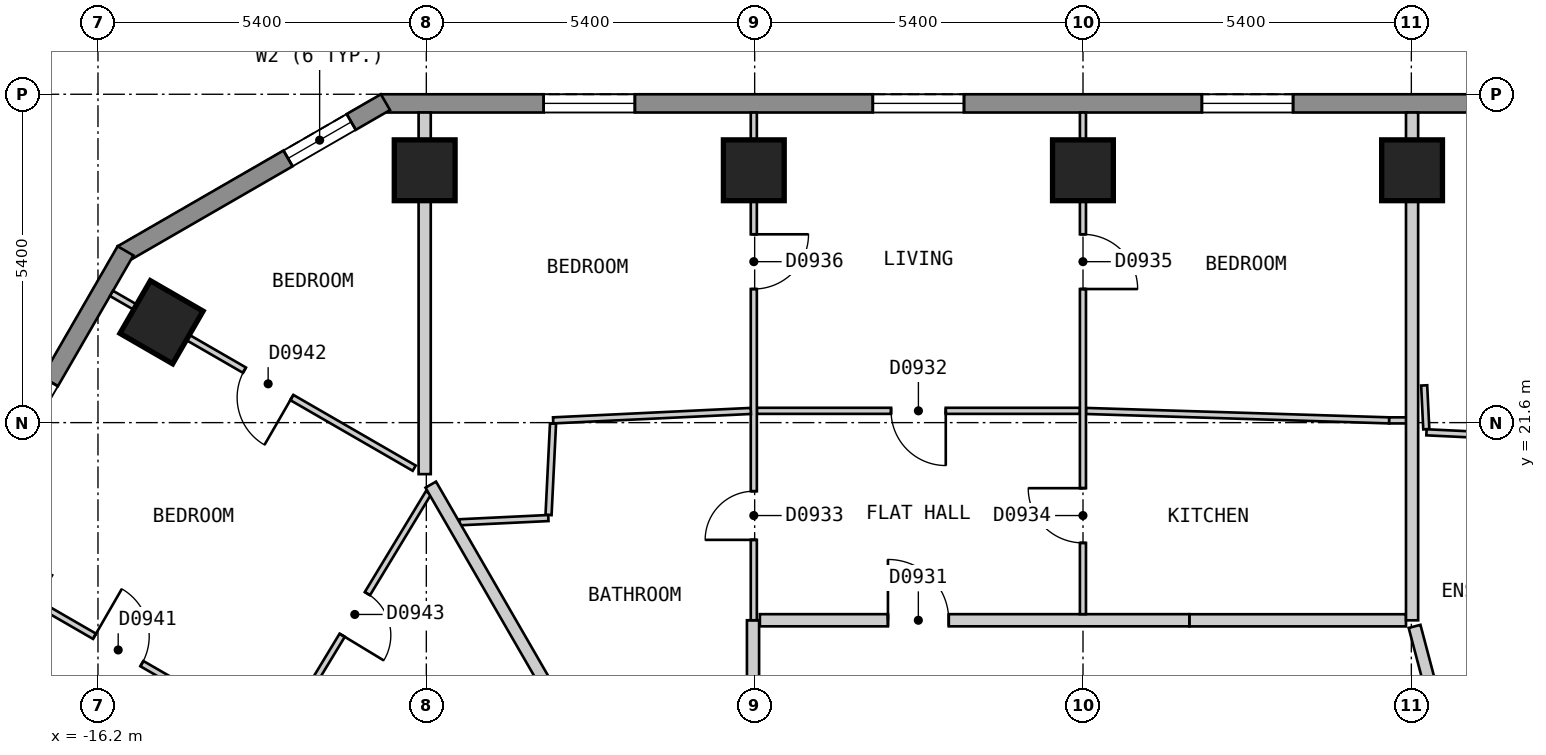
"""IFC4 building model, lengths in metres.
Left out: names, types, materials, properties, quantities, classifications, styles, units other than length and angle.
Written with IfcOpenShell. Run it as: python <this file> out.ifc"""

import sys

from ifc_helpers import new_model, si_unit, direction, frame, frame_2d, origin, origin_2d, place, context, subcontext, project, spatial, polyline, rectangle, outline, extrude, element, fill, save


model = new_model("IFC4")
c1 = context("Model", 3, precision=1e-05, world=origin(), true_north=direction((0.0, 1.0)))
c2 = subcontext(c1, "Body", "Model", "MODEL_VIEW")
j1 = project(units=[si_unit("LENGTHUNIT", "METRE"), si_unit("PLANEANGLEUNIT", "RADIAN")], contexts=[c1])
p1 = place(None, origin())
s1 = spatial("IfcSite", under=j1, at=p1, CompositionType="ELEMENT")
p2 = place(p1, origin())
s2 = spatial("IfcBuilding", under=s1, at=p2, CompositionType="ELEMENT")
p3 = place(p2, frame((0.0, 0.0, 90.0)))
s3 = spatial("IfcBuildingStorey", under=s2, at=p3, CompositionType="ELEMENT", Elevation=90.0)
for number, where, z_axis, x_axis in (
    (1, (5.412, 25.75, 0.0), (0.0, 0.0, 1.0), (-1.0, 0.0, 0.0)),
    (2, (-0.001, 25.75, 0.0), (0.0, 0.0, 1.0), (-1.0, 0.0, 0.0)),
    (3, (-5.414, 25.75, 0.0), (0.0, 0.0, 1.0), (-1.0, 0.0, 0.0)),
    (4, (-10.827, 25.75, 0.0), (0.0, 0.0, 1.0), (-1.0, 0.0, 0.0)),
    (5, (-15.155, 23.251, 0.0), (0.0, 0.0, 1.0), (-0.5, -0.866, 0.0)),
):
    element("IfcColumn", number, at=place(p3, frame(where, z_axis=z_axis, x_axis=x_axis)), inside=s3, PredefinedType="COLUMN", context=c2, shape_type="SweptSolid", body=[
        extrude(rectangle(XDim=1.0, YDim=1.0, at=origin_2d()), origin(), (0.0, 0.0, 1.0), 3.0),
    ])
p4 = place(p3, frame((11.547, 26.85, 0.0), z_axis=(0.0, 0.0, 1.0), x_axis=(-1.0, 0.0, 0.0)))
e6 = element("IfcWall", 6, at=p4, inside=s3, PredefinedType="SOLIDWALL", context=c2, shape_type="SweptSolid", body=[
    extrude(outline(polyline([(0.0, -0.15), (23.094, -0.15), (23.014, 0.15), (0.08, 0.15), (0.0, -0.15)])), origin(), (0.0, 0.0, 1.0), 2.7),
])
p5 = place(p4, frame((2.678, 0.0, 0.15)))
e7 = element("IfcOpeningElement", 7, at=p5, cuts=e6, PredefinedType="OPENING", context=c2, shape_type="SweptSolid", body=[
    extrude(rectangle(XDim=1.5, YDim=2.1, at=frame_2d((0.75, 1.05))), frame((0.0, 0.16, 0.0), z_axis=(0.0, -1.0, 0.0), x_axis=(1.0, 0.0, 0.0)), (0.0, 0.0, 1.0), 0.32),
])
p6 = place(p4, frame((8.092, 0.0, 0.15)))
e8 = element("IfcOpeningElement", 8, at=p6, cuts=e6, PredefinedType="OPENING", context=c2, shape_type="SweptSolid", body=[
    extrude(rectangle(XDim=1.5, YDim=2.1, at=frame_2d((0.75, 1.05))), frame((0.0, 0.16, 0.0), z_axis=(0.0, -1.0, 0.0), x_axis=(1.0, 0.0, 0.0)), (0.0, 0.0, 1.0), 0.32),
])
p7 = place(p4, frame((13.504, 0.0, 0.15)))
e9 = element("IfcOpeningElement", 9, at=p7, cuts=e6, PredefinedType="OPENING", context=c2, shape_type="SweptSolid", body=[
    extrude(rectangle(XDim=1.5, YDim=2.1, at=frame_2d((0.75, 1.05))), frame((0.0, 0.16, 0.0), z_axis=(0.0, -1.0, 0.0), x_axis=(1.0, 0.0, 0.0)), (0.0, 0.0, 1.0), 0.32),
])
p8 = place(p4, frame((18.917, 0.0, 0.15)))
e10 = element("IfcOpeningElement", 10, at=p8, cuts=e6, PredefinedType="OPENING", context=c2, shape_type="SweptSolid", body=[
    extrude(rectangle(XDim=1.5, YDim=2.1, at=frame_2d((0.75, 1.05))), frame((0.0, 0.16, 0.0), z_axis=(0.0, -1.0, 0.0), x_axis=(1.0, 0.0, 0.0)), (0.0, 0.0, 1.0), 0.32),
])
p9 = place(p3, frame((-11.472, 26.87, 0.0), z_axis=(0.0, 0.0, 1.0), x_axis=(-0.866022959057, -0.500004234368, 0.0)))
e11 = element("IfcWall", 11, at=p9, inside=s3, PredefinedType="SOLIDWALL", context=c2, shape_type="SweptSolid", body=[
    extrude(outline(polyline([(0.0, -0.15), (5.0, -0.15), (4.92, 0.15), (0.08, 0.15), (0.0, -0.15)])), origin(), (0.0, 0.0, 1.0), 2.7),
])
p10 = place(p9, frame((0.65, 0.0, 0.15)))
e12 = element("IfcOpeningElement", 12, at=p10, cuts=e11, PredefinedType="OPENING", context=c2, shape_type="SweptSolid", body=[
    extrude(rectangle(XDim=1.2, YDim=2.1, at=frame_2d((0.6, 1.05))), frame((0.0, 0.16, 0.0), z_axis=(0.0, -1.0, 0.0), x_axis=(1.0, 0.0, 0.0)), (0.0, 0.0, 1.0), 0.32),
])
p11 = place(p3, frame((-15.747, 24.425, 0.0), z_axis=(0.0, 0.0, 1.0), x_axis=(-0.500027479704, -0.866009537788, 0.0)))
e13 = element("IfcWall", 13, at=p11, inside=s3, PredefinedType="SOLIDWALL", context=c2, shape_type="SweptSolid", body=[
    extrude(outline(polyline([(0.0, -0.15), (26.559, -0.15), (26.478, 0.15), (0.08, 0.15), (0.0, -0.15)])), origin(), (0.0, 0.0, 1.0), 2.7),
])
p12 = place(p11, frame((2.483, 0.0, 0.15)))
e14 = element("IfcOpeningElement", 14, at=p12, cuts=e13, PredefinedType="OPENING", context=c2, shape_type="SweptSolid", body=[
    extrude(rectangle(XDim=1.5, YDim=2.1, at=frame_2d((0.75, 1.05))), frame((0.0, 0.16, 0.0), z_axis=(0.0, -1.0, 0.0), x_axis=(1.0, 0.0, 0.0)), (0.0, 0.0, 1.0), 0.32),
])
p13 = place(p11, frame((7.506, 0.0, 0.15)))
e15 = element("IfcOpeningElement", 15, at=p13, cuts=e13, PredefinedType="OPENING", context=c2, shape_type="SweptSolid", body=[
    extrude(rectangle(XDim=1.5, YDim=2.1, at=frame_2d((0.75, 1.05))), frame((0.0, 0.16, 0.0), z_axis=(0.0, -1.0, 0.0), x_axis=(1.0, 0.0, 0.0)), (0.0, 0.0, 1.0), 0.32),
])
p14 = place(p11, frame((12.529, 0.0, 0.15)))
e16 = element("IfcOpeningElement", 16, at=p14, cuts=e13, PredefinedType="OPENING", context=c2, shape_type="SweptSolid", body=[
    extrude(rectangle(XDim=1.5, YDim=2.1, at=frame_2d((0.75, 1.05))), frame((0.0, 0.16, 0.0), z_axis=(0.0, -1.0, 0.0), x_axis=(1.0, 0.0, 0.0)), (0.0, 0.0, 1.0), 0.32),
])
p15 = place(p11, frame((17.552, 0.0, 0.15)))
e17 = element("IfcOpeningElement", 17, at=p15, cuts=e13, PredefinedType="OPENING", context=c2, shape_type="SweptSolid", body=[
    extrude(rectangle(XDim=1.5, YDim=2.1, at=frame_2d((0.75, 1.05))), frame((0.0, 0.16, 0.0), z_axis=(0.0, -1.0, 0.0), x_axis=(1.0, 0.0, 0.0)), (0.0, 0.0, 1.0), 0.32),
])
p16 = place(p11, frame((22.575, 0.0, 0.15)))
e18 = element("IfcOpeningElement", 18, at=p16, cuts=e13, PredefinedType="OPENING", context=c2, shape_type="SweptSolid", body=[
    extrude(rectangle(XDim=1.5, YDim=2.1, at=frame_2d((0.75, 1.05))), frame((0.0, 0.16, 0.0), z_axis=(0.0, -1.0, 0.0), x_axis=(1.0, 0.0, 0.0)), (0.0, 0.0, 1.0), 0.32),
])
p17 = place(p3, frame((5.453, 18.249, 0.0), z_axis=(0.0, 0.0, 1.0), x_axis=(0.255385747764, -0.966839241983, 0.0)))
e19 = element("IfcWall", 19, at=p17, inside=s3, PredefinedType="PARTITIONING", context=c2, shape_type="SweptSolid", body=[
    extrude(rectangle(XDim=1.602, YDim=0.2, at=frame_2d((0.801, 0.0))), origin(), (0.0, 0.0, 1.0), 2.7),
])
p18 = place(p3, frame((1.75, 18.349, 0.0), z_axis=(0.0, 0.0, 1.0), x_axis=(1.0, 0.0, 0.0)))
e20 = element("IfcWall", 20, at=p18, inside=s3, PredefinedType="PARTITIONING", context=c2, shape_type="SweptSolid", body=[
    extrude(rectangle(XDim=3.562, YDim=0.2, at=frame_2d((1.781, 0.0))), origin(), (0.0, 0.0, 1.0), 2.7),
])
p19 = place(p3, frame((-5.314, 18.35, 0.0), z_axis=(0.0, 0.0, 1.0), x_axis=(1.0, 0.0, 0.0)))
e21 = element("IfcWall", 21, at=p19, inside=s3, PredefinedType="PARTITIONING", context=c2, shape_type="SweptSolid", body=[
    extrude(rectangle(XDim=7.063, YDim=0.2, at=frame_2d((3.531, 0.0))), origin(), (0.0, 0.0, 1.0), 2.7),
])
p20 = place(p19, frame((2.106, 0.0, 0.0)))
e22 = element("IfcOpeningElement", 22, at=p20, cuts=e21, PredefinedType="OPENING", context=c2, shape_type="SweptSolid", body=[
    extrude(rectangle(XDim=1.0, YDim=2.1, at=frame_2d((0.5, 1.05))), frame((0.0, 0.11, 0.0), z_axis=(0.0, -1.0, 0.0), x_axis=(1.0, 0.0, 0.0)), (0.0, 0.0, 1.0), 0.22),
])
p21 = place(p3, frame((-5.427, 17.4, 0.0), z_axis=(0.0, 0.0, 1.0), x_axis=(0.0, 1.0, 0.0)))
e23 = element("IfcWall", 23, at=p21, inside=s3, PredefinedType="PARTITIONING", context=c2, shape_type="SweptSolid", body=[
    extrude(rectangle(XDim=0.95, YDim=0.2, at=frame_2d((0.475, 0.0))), origin(), (0.0, 0.0, 1.0), 2.7),
])
p22 = place(p3, frame((5.611, 22.212, 0.0), z_axis=(0.0, 0.0, 1.0), x_axis=(0.048368650834, -0.998829551834, 0.0)))
e24 = element("IfcWall", 24, at=p22, inside=s3, PredefinedType="PARTITIONING", context=c2, shape_type="SweptSolid", body=[
    extrude(rectangle(XDim=0.722, YDim=0.1, at=frame_2d((0.361, 0.0))), origin(), (0.0, 0.0, 1.0), 2.7),
])
p23 = place(p3, frame((0.049, 21.792, 0.0), z_axis=(0.0, 0.0, 1.0), x_axis=(0.999517123417, -0.031072817652, 0.0)))
e25 = element("IfcWall", 25, at=p23, inside=s3, PredefinedType="PARTITIONING", context=c2, shape_type="SweptSolid", body=[
    extrude(rectangle(XDim=4.989, YDim=0.1, at=frame_2d((2.495, 0.0))), origin(), (0.0, 0.0, 1.0), 2.7),
])
p24 = place(p3, frame((5.649, 21.441, 0.0), z_axis=(0.0, 0.0, 1.0), x_axis=(0.998867332207, -0.047582062273, 0.0)))
e26 = element("IfcWall", 26, at=p24, inside=s3, PredefinedType="PARTITIONING", context=c2, shape_type="SweptSolid", body=[
    extrude(rectangle(XDim=2.058, YDim=0.1, at=frame_2d((1.029, 0.0))), origin(), (0.0, 0.0, 1.0), 2.7),
])
p25 = place(p3, frame((-18.489, 19.375, 0.0), z_axis=(0.0, 0.0, 1.0), x_axis=(0.866016855193, -0.500014806302, 0.0)))
e27 = element("IfcWall", 27, at=p25, inside=s3, PredefinedType="PARTITIONING", context=c2, shape_type="SweptSolid", body=[
    extrude(rectangle(XDim=10.0, YDim=0.1, at=frame_2d((5.0, 0.0))), origin(), (0.0, 0.0, 1.0), 2.7),
])
p26 = place(p25, frame((2.577, 0.0, 0.0)))
e28 = element("IfcOpeningElement", 28, at=p26, cuts=e27, PredefinedType="OPENING", context=c2, shape_type="SweptSolid", body=[
    extrude(rectangle(XDim=0.9, YDim=2.1, at=frame_2d((0.45, 1.05))), frame((0.0, 0.06, 0.0), z_axis=(0.0, -1.0, 0.0), x_axis=(1.0, 0.0, 0.0)), (0.0, 0.0, 1.0), 0.12),
])
p27 = place(p3, frame((-15.977, 23.725, 0.0), z_axis=(0.0, 0.0, 1.0), x_axis=(0.866028566888, -0.499994521305, 0.0)))
e29 = element("IfcWall", 29, at=p27, inside=s3, PredefinedType="PARTITIONING", context=c2, shape_type="SweptSolid", body=[
    extrude(rectangle(XDim=5.748, YDim=0.1, at=frame_2d((2.874, 0.0))), origin(), (0.0, 0.0, 1.0), 2.7),
])
p28 = place(p27, frame((2.524, 0.0, 0.0)))
e30 = element("IfcOpeningElement", 30, at=p28, cuts=e29, PredefinedType="OPENING", context=c2, shape_type="SweptSolid", body=[
    extrude(rectangle(XDim=0.9, YDim=2.1, at=frame_2d((0.45, 1.05))), frame((0.0, 0.06, 0.0), z_axis=(0.0, -1.0, 0.0), x_axis=(1.0, 0.0, 0.0)), (0.0, 0.0, 1.0), 0.12),
])
p29 = place(p3, frame((5.036, 21.637, 0.0), z_axis=(0.0, 0.0, 1.0), x_axis=(1.0, 0.0, 0.0)))
e31 = element("IfcWall", 31, at=p29, inside=s3, PredefinedType="PARTITIONING", context=c2, shape_type="SweptSolid", body=[
    extrude(rectangle(XDim=0.337, YDim=0.1, at=frame_2d((0.168, 0.0))), origin(), (0.0, 0.0, 1.0), 2.7),
])
p30 = place(p3, frame((-5.364, 21.794, 0.0), z_axis=(0.0, 0.0, 1.0), x_axis=(1.0, 0.0, 0.0)))
e32 = element("IfcWall", 32, at=p30, inside=s3, PredefinedType="PARTITIONING", context=c2, shape_type="SweptSolid", body=[
    extrude(rectangle(XDim=5.313, YDim=0.1, at=frame_2d((2.656, 0.0))), origin(), (0.0, 0.0, 1.0), 2.7),
])
p31 = place(p30, frame((2.207, 0.0, 0.0)))
e33 = element("IfcOpeningElement", 33, at=p31, cuts=e32, PredefinedType="OPENING", context=c2, shape_type="SweptSolid", body=[
    extrude(rectangle(XDim=0.9, YDim=2.1, at=frame_2d((0.45, 1.05))), frame((0.0, 0.06, 0.0), z_axis=(0.0, -1.0, 0.0), x_axis=(1.0, 0.0, 0.0)), (0.0, 0.0, 1.0), 0.12),
])
p32 = place(p3, frame((-13.221, 16.391, 0.0), z_axis=(0.0, 0.0, 1.0), x_axis=(0.518164725284, 0.855280841286, 0.0)))
e34 = element("IfcWall", 34, at=p32, inside=s3, PredefinedType="PARTITIONING", context=c2, shape_type="SweptSolid", body=[
    extrude(rectangle(XDim=4.74, YDim=0.1, at=frame_2d((2.37, 0.0))), origin(), (0.0, 0.0, 1.0), 2.7),
])
p33 = place(p32, frame((2.002, 0.0, 0.0)))
e35 = element("IfcOpeningElement", 35, at=p33, cuts=e34, PredefinedType="OPENING", context=c2, shape_type="SweptSolid", body=[
    extrude(rectangle(XDim=0.8, YDim=2.1, at=frame_2d((0.4, 1.05))), frame((0.0, 0.06, 0.0), z_axis=(0.0, -1.0, 0.0), x_axis=(1.0, 0.0, 0.0)), (0.0, 0.0, 1.0), 0.12),
])
p34 = place(p3, frame((-8.79, 20.081, 0.0), z_axis=(0.0, 0.0, 1.0), x_axis=(0.049097109821, 0.998794009697, 0.0)))
e36 = element("IfcWall", 36, at=p34, inside=s3, PredefinedType="PARTITIONING", context=c2, shape_type="SweptSolid", body=[
    extrude(rectangle(XDim=1.507, YDim=0.1, at=frame_2d((0.753, 0.0))), origin(), (0.0, 0.0, 1.0), 2.7),
])
p35 = place(p3, frame((-0.001, 18.45, 0.0), z_axis=(0.0, 0.0, 1.0), x_axis=(0.0, 1.0, 0.0)))
e37 = element("IfcWall", 37, at=p35, inside=s3, PredefinedType="PARTITIONING", context=c2, shape_type="SweptSolid", body=[
    extrude(rectangle(XDim=8.25, YDim=0.1, at=frame_2d((4.125, 0.0))), origin(), (0.0, 0.0, 1.0), 2.7),
])
p36 = place(p35, frame((1.172, 0.0, 0.0)))
e38 = element("IfcOpeningElement", 38, at=p36, cuts=e37, PredefinedType="OPENING", context=c2, shape_type="SweptSolid", body=[
    extrude(rectangle(XDim=0.9, YDim=2.1, at=frame_2d((0.45, 1.05))), frame((0.0, 0.06, 0.0), z_axis=(0.0, -1.0, 0.0), x_axis=(1.0, 0.0, 0.0)), (0.0, 0.0, 1.0), 0.12),
])
p37 = place(p35, frame((5.347, 0.0, 0.0)))
e39 = element("IfcOpeningElement", 39, at=p37, cuts=e37, PredefinedType="OPENING", context=c2, shape_type="SweptSolid", body=[
    extrude(rectangle(XDim=0.9, YDim=2.1, at=frame_2d((0.45, 1.05))), frame((0.0, 0.06, 0.0), z_axis=(0.0, -1.0, 0.0), x_axis=(1.0, 0.0, 0.0)), (0.0, 0.0, 1.0), 0.12),
])
p38 = place(p3, frame((-5.414, 18.35, 0.0), z_axis=(0.0, 0.0, 1.0), x_axis=(0.0, 1.0, 0.0)))
e40 = element("IfcWall", 40, at=p38, inside=s3, PredefinedType="PARTITIONING", context=c2, shape_type="SweptSolid", body=[
    extrude(rectangle(XDim=8.35, YDim=0.1, at=frame_2d((4.175, 0.0))), origin(), (0.0, 0.0, 1.0), 2.7),
])
p39 = place(p38, frame((1.322, 0.0, 0.0)))
e41 = element("IfcOpeningElement", 41, at=p39, cuts=e40, PredefinedType="OPENING", context=c2, shape_type="SweptSolid", body=[
    extrude(rectangle(XDim=0.8, YDim=2.1, at=frame_2d((0.4, 1.05))), frame((0.0, 0.06, 0.0), z_axis=(0.0, -1.0, 0.0), x_axis=(1.0, 0.0, 0.0)), (0.0, 0.0, 1.0), 0.12),
])
p40 = place(p38, frame((5.447, 0.0, 0.0)))
e42 = element("IfcOpeningElement", 42, at=p40, cuts=e40, PredefinedType="OPENING", context=c2, shape_type="SweptSolid", body=[
    extrude(rectangle(XDim=0.9, YDim=2.1, at=frame_2d((0.45, 1.05))), frame((0.0, 0.06, 0.0), z_axis=(0.0, -1.0, 0.0), x_axis=(1.0, 0.0, 0.0)), (0.0, 0.0, 1.0), 0.12),
])
p41 = place(p3, frame((-10.254, 19.961, 0.0), z_axis=(0.0, 0.0, 1.0), x_axis=(0.998851840647, 0.047906162812, 0.0)))
e43 = element("IfcWall", 43, at=p41, inside=s3, PredefinedType="PARTITIONING", context=c2, shape_type="SweptSolid", body=[
    extrude(rectangle(XDim=1.463, YDim=0.1, at=frame_2d((0.731, 0.0))), origin(), (0.0, 0.0, 1.0), 2.7),
])
p42 = place(p3, frame((-8.714, 21.637, 0.0), z_axis=(0.0, 0.0, 1.0), x_axis=(0.998864229829, 0.047647144377, 0.0)))
e44 = element("IfcWall", 44, at=p42, inside=s3, PredefinedType="PARTITIONING", context=c2, shape_type="SweptSolid", body=[
    extrude(rectangle(XDim=3.254, YDim=0.1, at=frame_2d((1.627, 0.0))), origin(), (0.0, 0.0, 1.0), 2.7),
])
p43 = place(p3, frame((-10.727, 20.58, 0.0), z_axis=(0.0, 0.0, 1.0), x_axis=(0.500041272028, -0.866001574057, 0.0)))
e45 = element("IfcWall", 45, at=p43, inside=s3, PredefinedType="PARTITIONING", context=c2, shape_type="SweptSolid", body=[
    extrude(rectangle(XDim=4.596, YDim=0.2, at=frame_2d((2.298, 0.0))), origin(), (0.0, 0.0, 1.0), 2.7),
])
p44 = place(p3, frame((5.412, 18.349, 0.0), z_axis=(0.0, 0.0, 1.0), x_axis=(0.0, 1.0, 0.0)))
e46 = element("IfcWall", 46, at=p44, inside=s3, PredefinedType="PARTITIONING", context=c2, shape_type="SweptSolid", body=[
    extrude(rectangle(XDim=8.351, YDim=0.2, at=frame_2d((4.175, 0.0))), origin(), (0.0, 0.0, 1.0), 2.7),
])
p45 = place(p3, frame((-10.827, 20.753, 0.0), z_axis=(0.0, 0.0, 1.0), x_axis=(0.0, 1.0, 0.0)))
e47 = element("IfcWall", 47, at=p45, inside=s3, PredefinedType="PARTITIONING", context=c2, shape_type="SweptSolid", body=[
    extrude(rectangle(XDim=5.947, YDim=0.2, at=frame_2d((2.974, 0.0))), origin(), (0.0, 0.0, 1.0), 2.7),
])
p46 = place(p6, origin())
e48 = element("IfcWindow", 48, at=p46, inside=s3, PartitioningType="SINGLE_PANEL", PredefinedType="WINDOW", context=c2, shape_type="SweptSolid", body=[
    extrude(rectangle(XDim=1.5, YDim=2.1, at=frame_2d((0.75, 1.05))), frame((0.0, 0.03, 0.0), z_axis=(0.0, -1.0, 0.0), x_axis=(1.0, 0.0, 0.0)), (0.0, 0.0, 1.0), 0.06),
])
fill(e8, e48)
p47 = place(p7, origin())
e49 = element("IfcWindow", 49, at=p47, inside=s3, PartitioningType="SINGLE_PANEL", PredefinedType="WINDOW", context=c2, shape_type="SweptSolid", body=[
    extrude(rectangle(XDim=1.5, YDim=2.1, at=frame_2d((0.75, 1.05))), frame((0.0, 0.03, 0.0), z_axis=(0.0, -1.0, 0.0), x_axis=(1.0, 0.0, 0.0)), (0.0, 0.0, 1.0), 0.06),
])
fill(e9, e49)
p48 = place(p8, origin())
e50 = element("IfcWindow", 50, at=p48, inside=s3, PartitioningType="SINGLE_PANEL", PredefinedType="WINDOW", context=c2, shape_type="SweptSolid", body=[
    extrude(rectangle(XDim=1.5, YDim=2.1, at=frame_2d((0.75, 1.05))), frame((0.0, 0.03, 0.0), z_axis=(0.0, -1.0, 0.0), x_axis=(1.0, 0.0, 0.0)), (0.0, 0.0, 1.0), 0.06),
])
fill(e10, e50)
p49 = place(p10, origin())
e51 = element("IfcWindow", 51, at=p49, inside=s3, PartitioningType="SINGLE_PANEL", PredefinedType="WINDOW", context=c2, shape_type="SweptSolid", body=[
    extrude(rectangle(XDim=1.2, YDim=2.1, at=frame_2d((0.6, 1.05))), frame((0.0, 0.03, 0.0), z_axis=(0.0, -1.0, 0.0), x_axis=(1.0, 0.0, 0.0)), (0.0, 0.0, 1.0), 0.06),
])
fill(e12, e51)
p50 = place(p20, origin())
e52 = element("IfcDoor", 52, at=p50, inside=s3, OperationType="SINGLE_SWING_LEFT", PredefinedType="DOOR", context=c2, shape_type="SweptSolid", body=[
    extrude(rectangle(XDim=1.0, YDim=2.1, at=frame_2d((0.5, 1.05))), frame((0.0, 0.025, 0.0), z_axis=(0.0, -1.0, 0.0), x_axis=(1.0, 0.0, 0.0)), (0.0, 0.0, 1.0), 0.05),
])
fill(e22, e52)
p51 = place(p31, origin())
e53 = element("IfcDoor", 53, at=p51, inside=s3, OperationType="SINGLE_SWING_RIGHT", PredefinedType="DOOR", context=c2, shape_type="SweptSolid", body=[
    extrude(rectangle(XDim=0.9, YDim=2.1, at=frame_2d((0.45, 1.05))), frame((0.0, 0.025, 0.0), z_axis=(0.0, -1.0, 0.0), x_axis=(1.0, 0.0, 0.0)), (0.0, 0.0, 1.0), 0.05),
])
fill(e33, e53)
p52 = place(p39, origin())
e54 = element("IfcDoor", 54, at=p52, inside=s3, OperationType="SINGLE_SWING_LEFT", PredefinedType="DOOR", context=c2, shape_type="SweptSolid", body=[
    extrude(rectangle(XDim=0.8, YDim=2.1, at=frame_2d((0.4, 1.05))), frame((0.0, 0.025, 0.0), z_axis=(0.0, -1.0, 0.0), x_axis=(1.0, 0.0, 0.0)), (0.0, 0.0, 1.0), 0.05),
])
fill(e41, e54)
p53 = place(p36, origin())
e55 = element("IfcDoor", 55, at=p53, inside=s3, OperationType="SINGLE_SWING_RIGHT", PredefinedType="DOOR", context=c2, shape_type="SweptSolid", body=[
    extrude(rectangle(XDim=0.9, YDim=2.1, at=frame_2d((0.45, 1.05))), frame((0.0, 0.025, 0.0), z_axis=(0.0, -1.0, 0.0), x_axis=(1.0, 0.0, 0.0)), (0.0, 0.0, 1.0), 0.05),
])
fill(e38, e55)
p54 = place(p37, origin())
e56 = element("IfcDoor", 56, at=p54, inside=s3, OperationType="SINGLE_SWING_LEFT", PredefinedType="DOOR", context=c2, shape_type="SweptSolid", body=[
    extrude(rectangle(XDim=0.9, YDim=2.1, at=frame_2d((0.45, 1.05))), frame((0.0, 0.025, 0.0), z_axis=(0.0, -1.0, 0.0), x_axis=(1.0, 0.0, 0.0)), (0.0, 0.0, 1.0), 0.05),
])
fill(e39, e56)
p55 = place(p40, origin())
e57 = element("IfcDoor", 57, at=p55, inside=s3, OperationType="SINGLE_SWING_RIGHT", PredefinedType="DOOR", context=c2, shape_type="SweptSolid", body=[
    extrude(rectangle(XDim=0.9, YDim=2.1, at=frame_2d((0.45, 1.05))), frame((0.0, 0.025, 0.0), z_axis=(0.0, -1.0, 0.0), x_axis=(1.0, 0.0, 0.0)), (0.0, 0.0, 1.0), 0.05),
])
fill(e42, e57)
p56 = place(p26, origin())
e58 = element("IfcDoor", 58, at=p56, inside=s3, OperationType="SINGLE_SWING_LEFT", PredefinedType="DOOR", context=c2, shape_type="SweptSolid", body=[
    extrude(rectangle(XDim=0.9, YDim=2.1, at=frame_2d((0.45, 1.05))), frame((0.0, 0.025, 0.0), z_axis=(0.0, -1.0, 0.0), x_axis=(1.0, 0.0, 0.0)), (0.0, 0.0, 1.0), 0.05),
])
fill(e28, e58)
p57 = place(p28, origin())
e59 = element("IfcDoor", 59, at=p57, inside=s3, OperationType="SINGLE_SWING_RIGHT", PredefinedType="DOOR", context=c2, shape_type="SweptSolid", body=[
    extrude(rectangle(XDim=0.9, YDim=2.1, at=frame_2d((0.45, 1.05))), frame((0.0, 0.025, 0.0), z_axis=(0.0, -1.0, 0.0), x_axis=(1.0, 0.0, 0.0)), (0.0, 0.0, 1.0), 0.05),
])
fill(e30, e59)
p58 = place(p33, origin())
e60 = element("IfcDoor", 60, at=p58, inside=s3, OperationType="SINGLE_SWING_LEFT", PredefinedType="DOOR", context=c2, shape_type="SweptSolid", body=[
    extrude(rectangle(XDim=0.8, YDim=2.1, at=frame_2d((0.4, 1.05))), frame((0.0, 0.025, 0.0), z_axis=(0.0, -1.0, 0.0), x_axis=(1.0, 0.0, 0.0)), (0.0, 0.0, 1.0), 0.05),
])
fill(e35, e60)
save(model, sys.argv[1])
